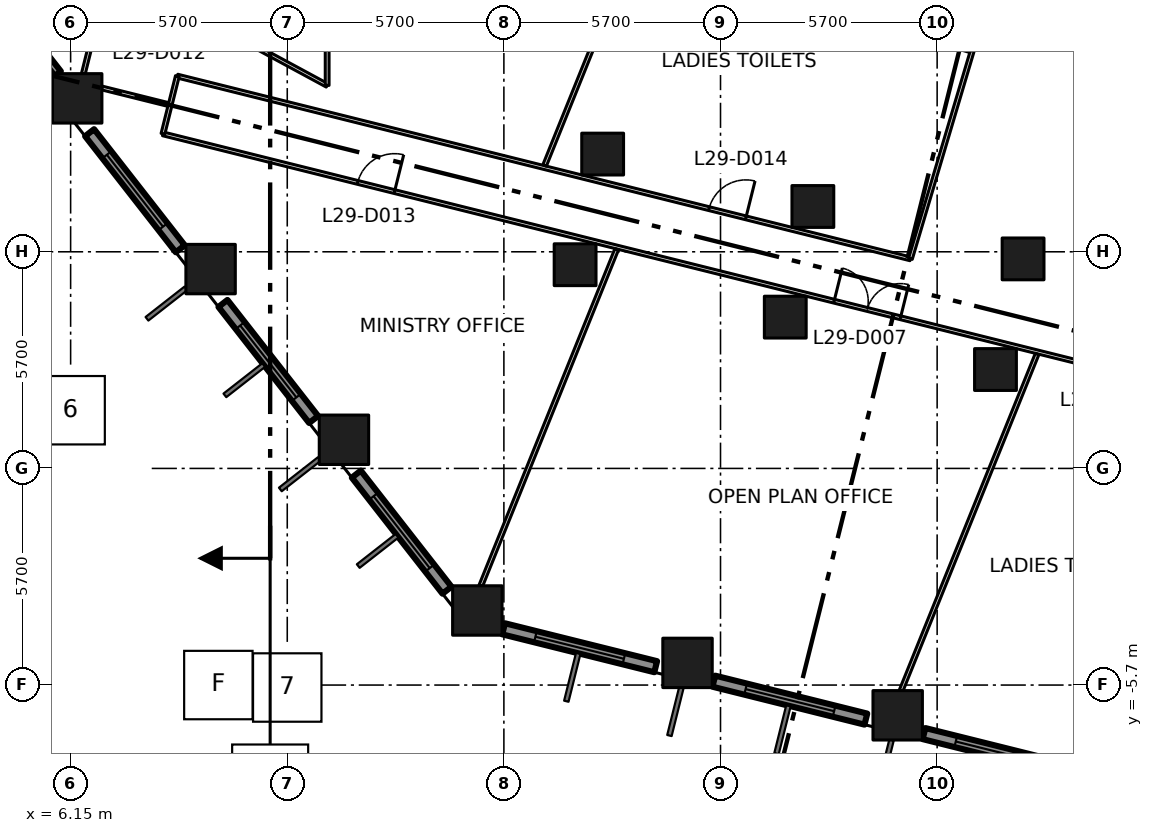
"""IFC4 building model, lengths in metres.
Left out: names, types, materials, properties, quantities, classifications, styles, units other than length and angle.
Written with IfcOpenShell. Run it as: python <this file> out.ifc"""

import sys

from ifc_helpers import new_model, si_unit, direction, frame, frame_2d, origin, origin_2d, place, context, subcontext, project, spatial, rectangle, extrude, element, fill, save


model = new_model("IFC4")
c1 = context("Model", 3, precision=1e-05, world=origin(), true_north=direction((0.0, 1.0)))
c2 = subcontext(c1, "Body", "Model", "MODEL_VIEW")
j1 = project(units=[si_unit("LENGTHUNIT", "METRE"), si_unit("PLANEANGLEUNIT", "RADIAN")], contexts=[c1])
p1 = place(None, origin())
s1 = spatial("IfcSite", under=j1, at=p1, CompositionType="ELEMENT")
p2 = place(p1, origin())
s2 = spatial("IfcBuilding", under=s1, at=p2, CompositionType="ELEMENT")
p3 = place(p2, frame((0.0, 0.0, 130.8)))
s3 = spatial("IfcBuildingStorey", under=s2, at=p3, CompositionType="ELEMENT", Elevation=130.8)
for number, where, z_axis, x_axis in (
    (1, (16.851, -3.738, 0.0), (0.0, 0.0, 1.0), (1.0, 0.0, 0.0)),
    (2, (13.342, 0.754, 0.0), (0.0, 0.0, 1.0), (1.0, 0.0, 0.0)),
    (3, (9.833, 5.245, 0.0), (0.0, 0.0, 1.0), (1.0, 0.0, 0.0)),
    (4, (6.323, 9.737, 0.0), (0.0, 0.0, 1.0), (1.0, 0.0, 0.0)),
    (5, (22.382, -5.117, 0.0), (0.0, 0.0, 1.0), (1.0, 0.0, 0.0)),
    (6, (27.912, -6.496, 0.0), (0.0, 0.0, 1.0), (1.0, 0.0, 0.0)),
):
    element("IfcColumn", number, at=place(p3, frame(where, z_axis=z_axis, x_axis=x_axis)), inside=s3, PredefinedType="COLUMN", context=c2, shape_type="SweptSolid", body=[
        extrude(rectangle(XDim=1.3, YDim=1.3, at=origin_2d()), origin(), (0.0, 0.0, 1.0), 4.2),
    ])
for number, where, z_axis, x_axis in (
    (7, (19.424, 5.36, 0.0), (0.0, 0.0, 1.0), (1.0, 0.0, 0.0)),
    (8, (24.954, 3.981, 0.0), (0.0, 0.0, 1.0), (1.0, 0.0, 0.0)),
    (9, (30.485, 2.602, 0.0), (0.0, 0.0, 1.0), (1.0, 0.0, 0.0)),
    (10, (20.149, 8.271, 0.0), (0.0, 0.0, 1.0), (1.0, 0.0, 0.0)),
    (11, (25.68, 6.892, 0.0), (0.0, 0.0, 1.0), (1.0, 0.0, 0.0)),
    (12, (31.211, 5.513, 0.0), (0.0, 0.0, 1.0), (1.0, 0.0, 0.0)),
):
    element("IfcColumn", number, at=place(p3, frame(where, z_axis=z_axis, x_axis=x_axis)), inside=s3, PredefinedType="COLUMN", context=c2, shape_type="SweptSolid", body=[
        extrude(rectangle(XDim=1.1, YDim=1.1, at=origin_2d()), origin(), (0.0, 0.0, 1.0), 4.2),
    ])
p4 = place(p3, frame((3.322, 13.579, 0.0), z_axis=(0.0, 0.0, 1.0), x_axis=(0.615500153734, -0.78813676526, 0.0)))
e13 = element("IfcWall", 13, at=p4, inside=s3, PredefinedType="SOLIDWALL", context=c2, shape_type="SweptSolid", body=[
    extrude(rectangle(XDim=4.05, YDim=0.2, at=frame_2d((2.025, 0.0))), origin(), (0.0, 0.0, 1.0), 3.1),
])
p5 = place(p4, frame((1.125, 0.0, 0.0)))
e14 = element("IfcOpeningElement", 14, at=p5, cuts=e13, PredefinedType="OPENING", context=c2, shape_type="SweptSolid", body=[
    extrude(rectangle(XDim=1.8, YDim=2.9, at=frame_2d((0.9, 1.45))), frame((0.0, 0.11, 0.0), z_axis=(0.0, -1.0, 0.0), x_axis=(1.0, 0.0, 0.0)), (0.0, 0.0, 1.0), 0.22),
])
p6 = place(p3, frame((6.649, 8.834, 0.0), z_axis=(0.0, 0.0, 1.0), x_axis=(0.615535257281, -0.788109349674, 0.0)))
e15 = element("IfcWall", 15, at=p6, inside=s3, PredefinedType="SOLIDWALL", context=c2, shape_type="SweptSolid", body=[
    extrude(rectangle(XDim=3.876, YDim=0.3, at=frame_2d((1.938, 0.0))), origin(), (0.0, 0.0, 1.0), 3.1),
])
p7 = place(p6, frame((0.738, 0.0, 0.8)))
e16 = element("IfcOpeningElement", 16, at=p7, cuts=e15, PredefinedType="OPENING", context=c2, shape_type="SweptSolid", body=[
    extrude(rectangle(XDim=2.4, YDim=2.1, at=frame_2d((1.2, 1.05))), frame((0.0, 0.16, 0.0), z_axis=(0.0, -1.0, 0.0), x_axis=(1.0, 0.0, 0.0)), (0.0, 0.0, 1.0), 0.32),
])
p8 = place(p3, frame((10.158, 4.341, 0.0), z_axis=(0.0, 0.0, 1.0), x_axis=(0.615779754703, -0.787918329332, 0.0)))
e17 = element("IfcWall", 17, at=p8, inside=s3, PredefinedType="SOLIDWALL", context=c2, shape_type="SweptSolid", body=[
    extrude(rectangle(XDim=3.875, YDim=0.3, at=frame_2d((1.938, 0.0))), origin(), (0.0, 0.0, 1.0), 3.1),
])
p9 = place(p8, frame((0.737, 0.0, 0.8)))
e18 = element("IfcOpeningElement", 18, at=p9, cuts=e17, PredefinedType="OPENING", context=c2, shape_type="SweptSolid", body=[
    extrude(rectangle(XDim=2.4, YDim=2.1, at=frame_2d((1.2, 1.05))), frame((0.0, 0.16, 0.0), z_axis=(0.0, -1.0, 0.0), x_axis=(1.0, 0.0, 0.0)), (0.0, 0.0, 1.0), 0.32),
])
p10 = place(p3, frame((13.667, -0.15, 0.0), z_axis=(0.0, 0.0, 1.0), x_axis=(0.615626928003, -0.788037743714, 0.0)))
e19 = element("IfcWall", 19, at=p10, inside=s3, PredefinedType="SOLIDWALL", context=c2, shape_type="SweptSolid", body=[
    extrude(rectangle(XDim=3.876, YDim=0.3, at=frame_2d((1.938, 0.0))), origin(), (0.0, 0.0, 1.0), 3.1),
])
p11 = place(p10, frame((0.738, 0.0, 0.8)))
e20 = element("IfcOpeningElement", 20, at=p11, cuts=e19, PredefinedType="OPENING", context=c2, shape_type="SweptSolid", body=[
    extrude(rectangle(XDim=2.4, YDim=2.1, at=frame_2d((1.2, 1.05))), frame((0.0, 0.16, 0.0), z_axis=(0.0, -1.0, 0.0), x_axis=(1.0, 0.0, 0.0)), (0.0, 0.0, 1.0), 0.32),
])
p12 = place(p3, frame((17.543, -4.22, 0.0), z_axis=(0.0, 0.0, 1.0), x_axis=(0.970337184445, -0.241755555227, 0.0)))
e21 = element("IfcWall", 21, at=p12, inside=s3, PredefinedType="SOLIDWALL", context=c2, shape_type="SweptSolid", body=[
    extrude(rectangle(XDim=4.124, YDim=0.3, at=frame_2d((2.062, 0.0))), origin(), (0.0, 0.0, 1.0), 3.1),
])
p13 = place(p12, frame((0.862, 0.0, 0.8)))
e22 = element("IfcOpeningElement", 22, at=p13, cuts=e21, PredefinedType="OPENING", context=c2, shape_type="SweptSolid", body=[
    extrude(rectangle(XDim=2.4, YDim=2.1, at=frame_2d((1.2, 1.05))), frame((0.0, 0.16, 0.0), z_axis=(0.0, -1.0, 0.0), x_axis=(1.0, 0.0, 0.0)), (0.0, 0.0, 1.0), 0.32),
])
p14 = place(p3, frame((23.074, -5.598, 0.0), z_axis=(0.0, 0.0, 1.0), x_axis=(0.970267747908, -0.242034083076, 0.0)))
e23 = element("IfcWall", 23, at=p14, inside=s3, PredefinedType="SOLIDWALL", context=c2, shape_type="SweptSolid", body=[
    extrude(rectangle(XDim=4.124, YDim=0.3, at=frame_2d((2.062, 0.0))), origin(), (0.0, 0.0, 1.0), 3.1),
])
p15 = place(p14, frame((0.862, 0.0, 0.8)))
e24 = element("IfcOpeningElement", 24, at=p15, cuts=e23, PredefinedType="OPENING", context=c2, shape_type="SweptSolid", body=[
    extrude(rectangle(XDim=2.4, YDim=2.1, at=frame_2d((1.2, 1.05))), frame((0.0, 0.16, 0.0), z_axis=(0.0, -1.0, 0.0), x_axis=(1.0, 0.0, 0.0)), (0.0, 0.0, 1.0), 0.32),
])
p16 = place(p3, frame((28.604, -6.977, 0.0), z_axis=(0.0, 0.0, 1.0), x_axis=(0.970281616392, -0.241978480223, 0.0)))
e25 = element("IfcWall", 25, at=p16, inside=s3, PredefinedType="SOLIDWALL", context=c2, shape_type="SweptSolid", body=[
    extrude(rectangle(XDim=4.125, YDim=0.3, at=frame_2d((2.062, 0.0))), origin(), (0.0, 0.0, 1.0), 3.1),
])
p17 = place(p16, frame((0.862, 0.0, 0.8)))
e26 = element("IfcOpeningElement", 26, at=p17, cuts=e25, PredefinedType="OPENING", context=c2, shape_type="SweptSolid", body=[
    extrude(rectangle(XDim=2.4, YDim=2.1, at=frame_2d((1.2, 1.05))), frame((0.0, 0.16, 0.0), z_axis=(0.0, -1.0, 0.0), x_axis=(1.0, 0.0, 0.0)), (0.0, 0.0, 1.0), 0.32),
])
p18 = place(p3, frame((8.579, 8.803, 0.0), z_axis=(0.0, 0.0, 1.0), x_axis=(0.970297306393, -0.241915558008, 0.0)))
e27 = element("IfcWall", 27, at=p18, inside=s3, PredefinedType="PARTITIONING", context=c2, shape_type="SweptSolid", body=[
    extrude(rectangle(XDim=62.076, YDim=0.1, at=frame_2d((31.038, 0.0))), origin(), (0.0, 0.0, 1.0), 3.9),
])
p19 = place(p18, frame((35.799, 0.0, 0.0)))
e28 = element("IfcOpeningElement", 28, at=p19, cuts=e27, PredefinedType="OPENING", context=c2, shape_type="SweptSolid", body=[
    extrude(rectangle(XDim=1.8, YDim=2.1, at=frame_2d((0.9, 1.05))), frame((0.0, 0.06, 0.0), z_axis=(0.0, -1.0, 0.0), x_axis=(1.0, 0.0, 0.0)), (0.0, 0.0, 1.0), 0.12),
])
p20 = place(p18, frame((47.799, 0.0, 0.0)))
e29 = element("IfcOpeningElement", 29, at=p20, cuts=e27, PredefinedType="OPENING", context=c2, shape_type="SweptSolid", body=[
    extrude(rectangle(XDim=1.8, YDim=2.1, at=frame_2d((0.9, 1.05))), frame((0.0, 0.06, 0.0), z_axis=(0.0, -1.0, 0.0), x_axis=(1.0, 0.0, 0.0)), (0.0, 0.0, 1.0), 0.12),
])
p21 = place(p18, frame((53.599, 0.0, 0.0)))
e30 = element("IfcOpeningElement", 30, at=p21, cuts=e27, PredefinedType="OPENING", context=c2, shape_type="SweptSolid", body=[
    extrude(rectangle(XDim=1.0, YDim=2.1, at=frame_2d((0.5, 1.05))), frame((0.0, 0.06, 0.0), z_axis=(0.0, -1.0, 0.0), x_axis=(1.0, 0.0, 0.0)), (0.0, 0.0, 1.0), 0.12),
])
p22 = place(p18, frame((18.2, 0.0, 0.0)))
e31 = element("IfcOpeningElement", 31, at=p22, cuts=e27, PredefinedType="OPENING", context=c2, shape_type="SweptSolid", body=[
    extrude(rectangle(XDim=1.8, YDim=2.1, at=frame_2d((0.9, 1.05))), frame((0.0, 0.06, 0.0), z_axis=(0.0, -1.0, 0.0), x_axis=(1.0, 0.0, 0.0)), (0.0, 0.0, 1.0), 0.12),
])
p23 = place(p18, frame((26.099, 0.0, 0.0)))
e32 = element("IfcOpeningElement", 32, at=p23, cuts=e27, PredefinedType="OPENING", context=c2, shape_type="SweptSolid", body=[
    extrude(rectangle(XDim=1.0, YDim=2.1, at=frame_2d((0.5, 1.05))), frame((0.0, 0.06, 0.0), z_axis=(0.0, -1.0, 0.0), x_axis=(1.0, 0.0, 0.0)), (0.0, 0.0, 1.0), 0.12),
])
p24 = place(p18, frame((5.28, 0.0, 0.0)))
e33 = element("IfcOpeningElement", 33, at=p24, cuts=e27, PredefinedType="OPENING", context=c2, shape_type="SweptSolid", body=[
    extrude(rectangle(XDim=1.0, YDim=2.1, at=frame_2d((0.5, 1.05))), frame((0.0, 0.06, 0.0), z_axis=(0.0, -1.0, 0.0), x_axis=(1.0, 0.0, 0.0)), (0.0, 0.0, 1.0), 0.12),
])
p25 = place(p3, frame((8.958, 10.323, 0.0), z_axis=(0.0, 0.0, 1.0), x_axis=(0.970298340477, -0.241911410372, 0.0)))
e34 = element("IfcWall", 34, at=p25, inside=s3, PredefinedType="PARTITIONING", context=c2, shape_type="SweptSolid", body=[
    extrude(rectangle(XDim=19.88, YDim=0.1, at=frame_2d((9.94, 0.0))), origin(), (0.0, 0.0, 1.0), 3.9),
])
p26 = place(p25, frame((14.417, 0.0, 0.0)))
e35 = element("IfcOpeningElement", 35, at=p26, cuts=e34, PredefinedType="OPENING", context=c2, shape_type="SweptSolid", body=[
    extrude(rectangle(XDim=1.0, YDim=2.1, at=frame_2d((0.5, 1.05))), frame((0.0, 0.06, 0.0), z_axis=(0.0, -1.0, 0.0), x_axis=(1.0, 0.0, 0.0)), (0.0, 0.0, 1.0), 0.12),
])
p27 = place(p3, frame((8.958, 10.323, 0.0), z_axis=(0.0, 0.0, 1.0), x_axis=(-0.241875508386, -0.97030729073, 0.0)))
e36 = element("IfcWall", 36, at=p27, inside=s3, PredefinedType="PARTITIONING", context=c2, shape_type="SweptSolid", body=[
    extrude(rectangle(XDim=1.567, YDim=0.1, at=frame_2d((0.783, 0.0))), origin(), (0.0, 0.0, 1.0), 3.9),
])
p28 = place(p3, frame((9.9, 11.7, 0.0), z_axis=(0.0, 0.0, 1.0), x_axis=(0.87965147249, -0.475618846291, 0.0)))
e37 = element("IfcWall", 37, at=p28, inside=s3, PredefinedType="PARTITIONING", context=c2, shape_type="SweptSolid", body=[
    extrude(rectangle(XDim=3.41, YDim=0.1, at=frame_2d((1.705, 0.0))), origin(), (0.0, 0.0, 1.0), 3.9),
])
p29 = place(p3, frame((12.9, 10.078, 0.0), z_axis=(0.0, 0.0, 1.0), x_axis=(0.0, 1.0, 0.0)))
e38 = element("IfcWall", 38, at=p29, inside=s3, PredefinedType="PARTITIONING", context=c2, shape_type="SweptSolid", body=[
    extrude(rectangle(XDim=4.022, YDim=0.1, at=frame_2d((2.011, 0.0))), origin(), (0.0, 0.0, 1.0), 3.9),
])
p30 = place(p3, frame((28.247, 5.514, 0.0), z_axis=(0.0, 0.0, 1.0), x_axis=(0.285004107837, 0.958526295162, 0.0)))
e39 = element("IfcWall", 39, at=p30, inside=s3, PredefinedType="PARTITIONING", context=c2, shape_type="SweptSolid", body=[
    extrude(rectangle(XDim=8.958, YDim=0.1, at=frame_2d((4.479, 0.0))), origin(), (0.0, 0.0, 1.0), 3.9),
])
p31 = place(p30, frame((6.38, 0.0, 0.0)))
e40 = element("IfcOpeningElement", 40, at=p31, cuts=e39, PredefinedType="OPENING", context=c2, shape_type="SweptSolid", body=[
    extrude(rectangle(XDim=1.0, YDim=2.1, at=frame_2d((0.5, 1.05))), frame((0.0, 0.06, 0.0), z_axis=(0.0, -1.0, 0.0), x_axis=(1.0, 0.0, 0.0)), (0.0, 0.0, 1.0), 0.12),
])
p32 = place(p3, frame((6.797, 11.638, 0.0), z_axis=(0.0, 0.0, 1.0), x_axis=(-0.242000927221, -0.970276018061, 0.0)))
e41 = element("IfcWall", 41, at=p32, inside=s3, PredefinedType="PARTITIONING", context=c2, shape_type="SweptSolid", body=[
    extrude(rectangle(XDim=1.289, YDim=0.1, at=frame_2d((0.645, 0.0))), origin(), (0.0, 0.0, 1.0), 3.9),
])
p33 = place(p3, frame((8.719, 9.575, 0.0), z_axis=(0.0, 0.0, 1.0), x_axis=(-0.970333736057, 0.241769395645, 0.0)))
e42 = element("IfcWall", 42, at=p33, inside=s3, PredefinedType="PARTITIONING", context=c2, shape_type="SweptSolid", body=[
    extrude(rectangle(XDim=1.8, YDim=0.1, at=frame_2d((0.9, 0.0))), origin(), (0.0, 0.0, 1.0), 3.9),
])
p34 = place(p3, frame((16.942, -3.088, 0.0), z_axis=(0.0, 0.0, 1.0), x_axis=(0.374526444387, 0.927216232847, 0.0)))
e43 = element("IfcWall", 43, at=p34, inside=s3, PredefinedType="PARTITIONING", context=c2, shape_type="SweptSolid", body=[
    extrude(rectangle(XDim=9.551, YDim=0.1, at=frame_2d((4.775, 0.0))), origin(), (0.0, 0.0, 1.0), 3.9),
])
p35 = place(p3, frame((18.622, 7.972, 0.0), z_axis=(0.0, 0.0, 1.0), x_axis=(0.374464881939, 0.927241097123, 0.0)))
e44 = element("IfcWall", 44, at=p35, inside=s3, PredefinedType="PARTITIONING", context=c2, shape_type="SweptSolid", body=[
    extrude(rectangle(XDim=6.609, YDim=0.1, at=frame_2d((3.305, 0.0))), origin(), (0.0, 0.0, 1.0), 3.9),
])
p36 = place(p3, frame((28.002, -5.846, 0.0), z_axis=(0.0, 0.0, 1.0), x_axis=(0.374614343131, 0.927180723441, 0.0)))
e45 = element("IfcWall", 45, at=p36, inside=s3, PredefinedType="PARTITIONING", context=c2, shape_type="SweptSolid", body=[
    extrude(rectangle(XDim=9.552, YDim=0.1, at=frame_2d((4.776, 0.0))), origin(), (0.0, 0.0, 1.0), 3.9),
])
p37 = place(p3, frame((29.824, 10.991, 0.0), z_axis=(0.0, 0.0, 1.0), x_axis=(-0.958521516937, 0.285020177478, 0.0)))
e46 = element("IfcWall", 46, at=p37, inside=s3, PredefinedType="PARTITIONING", context=c2, shape_type="SweptSolid", body=[
    extrude(rectangle(XDim=2.551, YDim=0.1, at=frame_2d((1.275, 0.0))), origin(), (0.0, 0.0, 1.0), 3.9),
])
p38 = place(p7, origin())
e47 = element("IfcWindow", 47, at=p38, inside=s3, PartitioningType="DOUBLE_PANEL_VERTICAL", PredefinedType="WINDOW", context=c2, shape_type="SweptSolid", body=[
    extrude(rectangle(XDim=2.4, YDim=2.1, at=frame_2d((1.2, 1.05))), frame((0.0, 0.03, 0.0), z_axis=(0.0, -1.0, 0.0), x_axis=(1.0, 0.0, 0.0)), (0.0, 0.0, 1.0), 0.06),
])
fill(e16, e47)
p39 = place(p9, origin())
e48 = element("IfcWindow", 48, at=p39, inside=s3, PartitioningType="DOUBLE_PANEL_VERTICAL", PredefinedType="WINDOW", context=c2, shape_type="SweptSolid", body=[
    extrude(rectangle(XDim=2.4, YDim=2.1, at=frame_2d((1.2, 1.05))), frame((0.0, 0.03, 0.0), z_axis=(0.0, -1.0, 0.0), x_axis=(1.0, 0.0, 0.0)), (0.0, 0.0, 1.0), 0.06),
])
fill(e18, e48)
p40 = place(p11, origin())
e49 = element("IfcWindow", 49, at=p40, inside=s3, PartitioningType="DOUBLE_PANEL_VERTICAL", PredefinedType="WINDOW", context=c2, shape_type="SweptSolid", body=[
    extrude(rectangle(XDim=2.4, YDim=2.1, at=frame_2d((1.2, 1.05))), frame((0.0, 0.03, 0.0), z_axis=(0.0, -1.0, 0.0), x_axis=(1.0, 0.0, 0.0)), (0.0, 0.0, 1.0), 0.06),
])
fill(e20, e49)
p41 = place(p13, origin())
e50 = element("IfcWindow", 50, at=p41, inside=s3, PartitioningType="DOUBLE_PANEL_VERTICAL", PredefinedType="WINDOW", context=c2, shape_type="SweptSolid", body=[
    extrude(rectangle(XDim=2.4, YDim=2.1, at=frame_2d((1.2, 1.05))), frame((0.0, 0.03, 0.0), z_axis=(0.0, -1.0, 0.0), x_axis=(1.0, 0.0, 0.0)), (0.0, 0.0, 1.0), 0.06),
])
fill(e22, e50)
p42 = place(p15, origin())
e51 = element("IfcWindow", 51, at=p42, inside=s3, PartitioningType="DOUBLE_PANEL_VERTICAL", PredefinedType="WINDOW", context=c2, shape_type="SweptSolid", body=[
    extrude(rectangle(XDim=2.4, YDim=2.1, at=frame_2d((1.2, 1.05))), frame((0.0, 0.03, 0.0), z_axis=(0.0, -1.0, 0.0), x_axis=(1.0, 0.0, 0.0)), (0.0, 0.0, 1.0), 0.06),
])
fill(e24, e51)
p43 = place(p17, origin())
e52 = element("IfcWindow", 52, at=p43, inside=s3, PartitioningType="DOUBLE_PANEL_VERTICAL", PredefinedType="WINDOW", context=c2, shape_type="SweptSolid", body=[
    extrude(rectangle(XDim=2.4, YDim=2.1, at=frame_2d((1.2, 1.05))), frame((0.0, 0.03, 0.0), z_axis=(0.0, -1.0, 0.0), x_axis=(1.0, 0.0, 0.0)), (0.0, 0.0, 1.0), 0.06),
])
fill(e26, e52)
p44 = place(p22, origin())
e53 = element("IfcDoor", 53, at=p44, inside=s3, OperationType="DOUBLE_DOOR_SINGLE_SWING", PredefinedType="DOOR", context=c2, shape_type="SweptSolid", body=[
    extrude(rectangle(XDim=1.8, YDim=2.1, at=frame_2d((0.9, 1.05))), frame((0.0, 0.025, 0.0), z_axis=(0.0, -1.0, 0.0), x_axis=(1.0, 0.0, 0.0)), (0.0, 0.0, 1.0), 0.05),
])
fill(e31, e53)
p45 = place(p24, origin())
e54 = element("IfcDoor", 54, at=p45, inside=s3, OperationType="SINGLE_SWING_RIGHT", PredefinedType="DOOR", context=c2, shape_type="SweptSolid", body=[
    extrude(rectangle(XDim=1.0, YDim=2.1, at=frame_2d((0.5, 1.05))), frame((0.0, 0.025, 0.0), z_axis=(0.0, -1.0, 0.0), x_axis=(1.0, 0.0, 0.0)), (0.0, 0.0, 1.0), 0.05),
])
fill(e33, e54)
p46 = place(p26, origin())
e55 = element("IfcDoor", 55, at=p46, inside=s3, OperationType="SINGLE_SWING_RIGHT", PredefinedType="DOOR", context=c2, shape_type="SweptSolid", body=[
    extrude(rectangle(XDim=1.0, YDim=2.1, at=frame_2d((0.5, 1.05))), frame((0.0, 0.025, 0.0), z_axis=(0.0, -1.0, 0.0), x_axis=(1.0, 0.0, 0.0)), (0.0, 0.0, 1.0), 0.05),
])
fill(e35, e55)
save(model, sys.argv[1])
